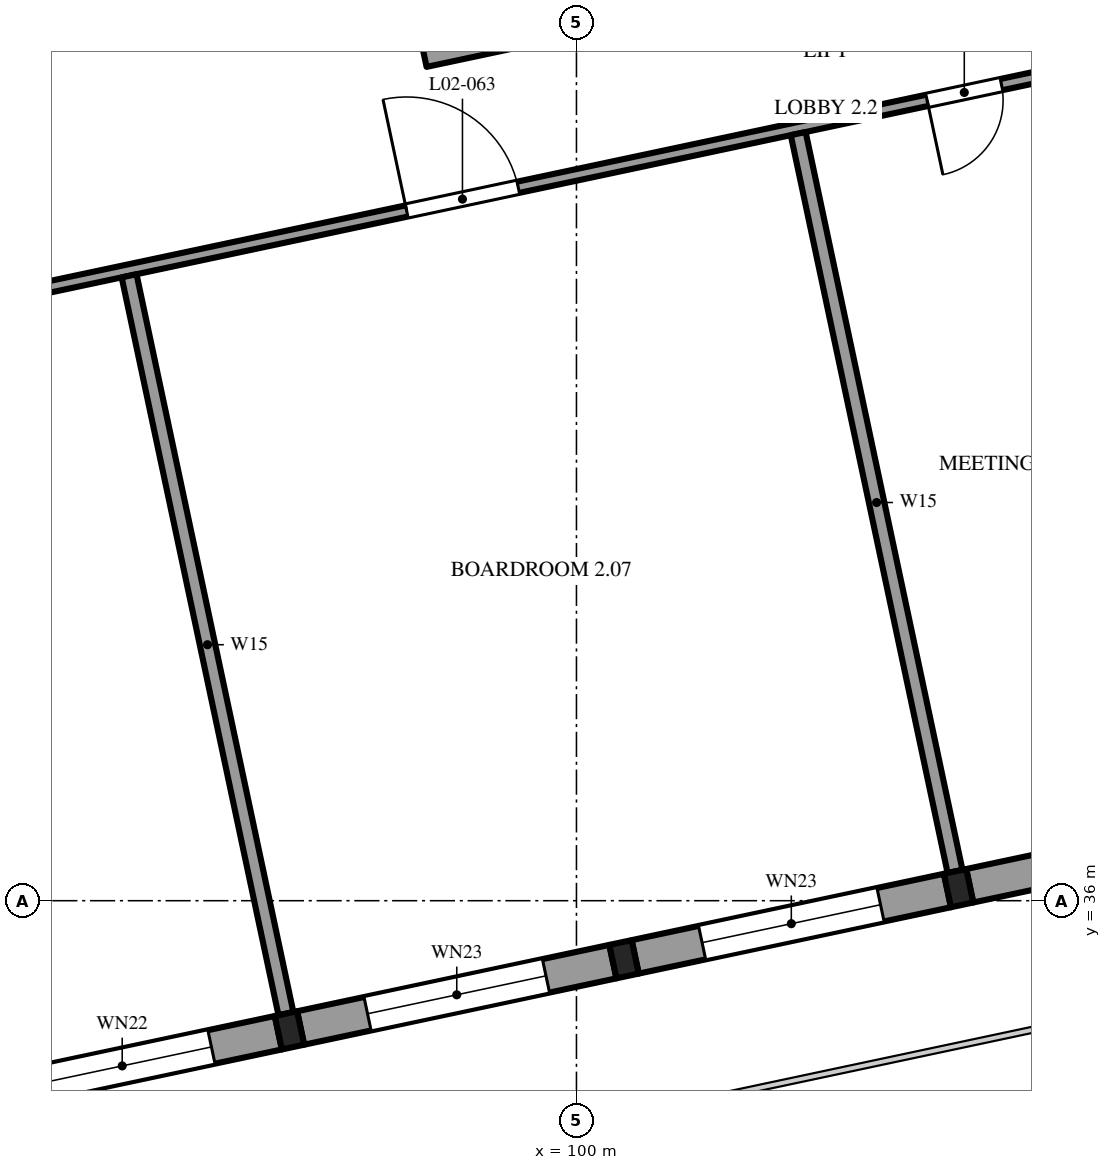
"""IFC4 building model, lengths in metres.
Left out: names, types, materials, properties, quantities, classifications, styles, units other than length and angle.
Written with IfcOpenShell. Run it as: python <this file> out.ifc"""

import sys

from ifc_helpers import new_model, si_unit, direction, frame, frame_2d, origin, origin_2d, place, context, subcontext, project, spatial, rectangle, i_section, extrude, element, fill, save


model = new_model("IFC4")
c1 = context("Model", 3, precision=1e-05, world=origin(), true_north=direction((0.0, 1.0)))
c2 = subcontext(c1, "Body", "Model", "MODEL_VIEW")
j1 = project(units=[si_unit("LENGTHUNIT", "METRE"), si_unit("PLANEANGLEUNIT", "RADIAN")], contexts=[c1])
p1 = place(None, origin())
s1 = spatial("IfcSite", under=j1, at=p1, CompositionType="ELEMENT")
p2 = place(p1, origin())
s2 = spatial("IfcBuilding", under=s1, at=p2, CompositionType="ELEMENT")
p3 = place(p2, frame((0.0, 0.0, 12.0)))
s3 = spatial("IfcBuildingStorey", under=s2, at=p3, CompositionType="ELEMENT", Elevation=12.0)
for number, where, z_axis, x_axis in (
    (1, (96.224, 34.294, 0.0), (0.0, 0.0, 1.0), (0.978, 0.208, 0.0)),
    (2, (100.626, 35.23, 0.0), (0.0, 0.0, 1.0), (0.978, 0.208, 0.0)),
    (3, (105.028, 36.165, 0.0), (0.0, 0.0, 1.0), (0.978, 0.208, 0.0)),
):
    element("IfcColumn", number, at=place(p3, frame(where, z_axis=z_axis, x_axis=x_axis)), inside=s3, PredefinedType="COLUMN", context=c2, shape_type="SweptSolid", body=[
        extrude(i_section(OverallWidth=0.3, OverallDepth=0.45, WebThickness=0.014, FlangeThickness=0.026, FilletRadius=0.027, at=origin_2d()), origin(), (0.0, 0.0, 1.0), 4.8),
    ])
p4 = place(p3, frame((97.997, 47.118, 0.0), z_axis=(0.0, 0.0, 1.0), x_axis=(0.978147662755, 0.20791139903, 0.0)))
e4 = element("IfcWall", 4, at=p4, inside=s3, PredefinedType="SHEAR", context=c2, shape_type="SweptSolid", body=[
    extrude(rectangle(XDim=13.7, YDim=0.3, at=frame_2d((6.85, 0.0))), origin(), (0.0, 0.0, 1.0), 4.8),
])
p5 = place(p4, frame((5.1, 0.0, 0.0)))
e5 = element("IfcOpeningElement", 5, at=p5, cuts=e4, PredefinedType="OPENING", context=c2, shape_type="SweptSolid", body=[
    extrude(rectangle(XDim=1.1, YDim=2.1, at=frame_2d((0.55, 1.05))), frame((0.0, 0.16, 0.0), z_axis=(0.0, -1.0, 0.0), x_axis=(1.0, 0.0, 0.0)), (0.0, 0.0, 1.0), 0.32),
])
p6 = place(p4, frame((7.5, 0.0, 0.0)))
e6 = element("IfcOpeningElement", 6, at=p6, cuts=e4, PredefinedType="OPENING", context=c2, shape_type="SweptSolid", body=[
    extrude(rectangle(XDim=1.1, YDim=2.1, at=frame_2d((0.55, 1.05))), frame((0.0, 0.16, 0.0), z_axis=(0.0, -1.0, 0.0), x_axis=(1.0, 0.0, 0.0)), (0.0, 0.0, 1.0), 0.32),
])
p7 = place(p3, frame((91.969, 33.39, 0.0), z_axis=(0.0, 0.0, 1.0), x_axis=(0.978143927149, 0.207928972925, 0.0)))
e7 = element("IfcWall", 7, at=p7, inside=s3, PredefinedType="SOLIDWALL", context=c2, shape_type="SweptSolid", body=[
    extrude(rectangle(XDim=4.2, YDim=0.45, at=frame_2d((2.1, 0.0))), origin(), (0.0, 0.0, 1.0), 4.35),
])
p8 = place(p7, frame((0.9, 0.0, 0.9)))
e8 = element("IfcOpeningElement", 8, at=p8, cuts=e7, PredefinedType="OPENING", context=c2, shape_type="SweptSolid", body=[
    extrude(rectangle(XDim=2.4, YDim=2.4, at=frame_2d((1.2, 1.2))), frame((0.0, 0.235, 0.0), z_axis=(0.0, -1.0, 0.0), x_axis=(1.0, 0.0, 0.0)), (0.0, 0.0, 1.0), 0.47),
])
p9 = place(p3, frame((96.371, 34.325, 0.0), z_axis=(0.0, 0.0, 1.0), x_axis=(0.978143927149, 0.207928972925, 0.0)))
e9 = element("IfcWall", 9, at=p9, inside=s3, PredefinedType="SOLIDWALL", context=c2, shape_type="SweptSolid", body=[
    extrude(rectangle(XDim=4.2, YDim=0.45, at=frame_2d((2.1, 0.0))), origin(), (0.0, 0.0, 1.0), 4.35),
])
p10 = place(p9, frame((0.9, 0.0, 0.6)))
e10 = element("IfcOpeningElement", 10, at=p10, cuts=e9, PredefinedType="OPENING", context=c2, shape_type="SweptSolid", body=[
    extrude(rectangle(XDim=2.4, YDim=2.7, at=frame_2d((1.2, 1.35))), frame((0.0, 0.235, 0.0), z_axis=(0.0, -1.0, 0.0), x_axis=(1.0, 0.0, 0.0)), (0.0, 0.0, 1.0), 0.47),
])
p11 = place(p3, frame((100.773, 35.261, 0.0), z_axis=(0.0, 0.0, 1.0), x_axis=(0.978143927149, 0.207928972925, 0.0)))
e11 = element("IfcWall", 11, at=p11, inside=s3, PredefinedType="SOLIDWALL", context=c2, shape_type="SweptSolid", body=[
    extrude(rectangle(XDim=4.2, YDim=0.45, at=frame_2d((2.1, 0.0))), origin(), (0.0, 0.0, 1.0), 4.35),
])
p12 = place(p11, frame((0.9, 0.0, 0.6)))
e12 = element("IfcOpeningElement", 12, at=p12, cuts=e11, PredefinedType="OPENING", context=c2, shape_type="SweptSolid", body=[
    extrude(rectangle(XDim=2.4, YDim=2.7, at=frame_2d((1.2, 1.35))), frame((0.0, 0.235, 0.0), z_axis=(0.0, -1.0, 0.0), x_axis=(1.0, 0.0, 0.0)), (0.0, 0.0, 1.0), 0.47),
])
p13 = place(p3, frame((105.174, 36.197, 0.0), z_axis=(0.0, 0.0, 1.0), x_axis=(0.978155748334, 0.207873355681, 0.0)))
e13 = element("IfcWall", 13, at=p13, inside=s3, PredefinedType="SOLIDWALL", context=c2, shape_type="SweptSolid", body=[
    extrude(rectangle(XDim=4.2, YDim=0.45, at=frame_2d((2.1, 0.0))), origin(), (0.0, 0.0, 1.0), 4.35),
])
p14 = place(p13, frame((0.9, 0.0, 0.9)))
e14 = element("IfcOpeningElement", 14, at=p14, cuts=e13, PredefinedType="OPENING", context=c2, shape_type="SweptSolid", body=[
    extrude(rectangle(XDim=2.4, YDim=2.4, at=frame_2d((1.2, 1.2))), frame((0.0, 0.235, 0.0), z_axis=(0.0, -1.0, 0.0), x_axis=(1.0, 0.0, 0.0)), (0.0, 0.0, 1.0), 0.47),
])
p15 = place(p3, frame((80.893, 41.489, 0.0), z_axis=(0.0, 0.0, 1.0), x_axis=(0.978147680869, 0.207911313813, 0.0)))
e15 = element("IfcWall", 15, at=p15, inside=s3, PredefinedType="PARTITIONING", context=c2, shape_type="SweptSolid", body=[
    extrude(rectangle(XDim=40.5, YDim=0.15, at=frame_2d((20.25, 0.0))), origin(), (0.0, 0.0, 1.0), 3.75),
])
p16 = place(p15, frame((1.75, 0.0, 0.0)))
e16 = element("IfcOpeningElement", 16, at=p16, cuts=e15, PredefinedType="OPENING", context=c2, shape_type="SweptSolid", body=[
    extrude(rectangle(XDim=1.0, YDim=2.1, at=frame_2d((0.5, 1.05))), frame((0.0, 0.085, 0.0), z_axis=(0.0, -1.0, 0.0), x_axis=(1.0, 0.0, 0.0)), (0.0, 0.0, 1.0), 0.17),
])
p17 = place(p15, frame((8.1, 0.0, 0.0)))
e17 = element("IfcOpeningElement", 17, at=p17, cuts=e15, PredefinedType="OPENING", context=c2, shape_type="SweptSolid", body=[
    extrude(rectangle(XDim=1.8, YDim=2.1, at=frame_2d((0.9, 1.05))), frame((0.0, 0.085, 0.0), z_axis=(0.0, -1.0, 0.0), x_axis=(1.0, 0.0, 0.0)), (0.0, 0.0, 1.0), 0.17),
])
p18 = place(p15, frame((17.25, 0.0, 0.0)))
e18 = element("IfcOpeningElement", 18, at=p18, cuts=e15, PredefinedType="OPENING", context=c2, shape_type="SweptSolid", body=[
    extrude(rectangle(XDim=1.5, YDim=2.1, at=frame_2d((0.75, 1.05))), frame((0.0, 0.085, 0.0), z_axis=(0.0, -1.0, 0.0), x_axis=(1.0, 0.0, 0.0)), (0.0, 0.0, 1.0), 0.17),
])
p19 = place(p15, frame((24.25, 0.0, 0.0)))
e19 = element("IfcOpeningElement", 19, at=p19, cuts=e15, PredefinedType="OPENING", context=c2, shape_type="SweptSolid", body=[
    extrude(rectangle(XDim=1.0, YDim=2.1, at=frame_2d((0.5, 1.05))), frame((0.0, 0.085, 0.0), z_axis=(0.0, -1.0, 0.0), x_axis=(1.0, 0.0, 0.0)), (0.0, 0.0, 1.0), 0.17),
])
p20 = place(p15, frame((30.6, 0.0, 0.0)))
e20 = element("IfcOpeningElement", 20, at=p20, cuts=e15, PredefinedType="OPENING", context=c2, shape_type="SweptSolid", body=[
    extrude(rectangle(XDim=1.8, YDim=2.1, at=frame_2d((0.9, 1.05))), frame((0.0, 0.085, 0.0), z_axis=(0.0, -1.0, 0.0), x_axis=(1.0, 0.0, 0.0)), (0.0, 0.0, 1.0), 0.17),
])
p21 = place(p15, frame((37.75, 0.0, 0.0)))
e21 = element("IfcOpeningElement", 21, at=p21, cuts=e15, PredefinedType="OPENING", context=c2, shape_type="SweptSolid", body=[
    extrude(rectangle(XDim=1.0, YDim=2.1, at=frame_2d((0.5, 1.05))), frame((0.0, 0.085, 0.0), z_axis=(0.0, -1.0, 0.0), x_axis=(1.0, 0.0, 0.0)), (0.0, 0.0, 1.0), 0.17),
])
p22 = place(p3, frame((96.177, 34.514, 0.0), z_axis=(0.0, 0.0, 1.0), x_axis=(-0.20790935802, 0.978148096582, 0.0)))
e22 = element("IfcWall", 22, at=p22, inside=s3, PredefinedType="PARTITIONING", context=c2, shape_type="SweptSolid", body=[
    extrude(rectangle(XDim=9.925, YDim=0.2, at=frame_2d((4.962, 0.0))), origin(), (0.0, 0.0, 1.0), 3.75),
])
p23 = place(p3, frame((104.981, 36.385, 0.0), z_axis=(0.0, 0.0, 1.0), x_axis=(-0.207927890391, 0.978144157268, 0.0)))
e23 = element("IfcWall", 23, at=p23, inside=s3, PredefinedType="PARTITIONING", context=c2, shape_type="SweptSolid", body=[
    extrude(rectangle(XDim=9.925, YDim=0.2, at=frame_2d((4.963, 0.0))), origin(), (0.0, 0.0, 1.0), 3.75),
])
p24 = place(p3, frame((59.663, 40.605, 0.0), z_axis=(0.0, 0.0, 1.0), x_axis=(0.978147466509, 0.207912322295, 0.0)))
e24 = element("IfcWall", 24, at=p24, inside=s3, PredefinedType="PARTITIONING", context=c2, shape_type="SweptSolid", body=[
    extrude(rectangle(XDim=34.45, YDim=0.15, at=frame_2d((17.225, 0.0))), origin(), (0.0, 0.0, 1.0), 3.75),
])
p25 = place(p24, frame((3.225, 0.0, 0.0)))
e25 = element("IfcOpeningElement", 25, at=p25, cuts=e24, PredefinedType="OPENING", context=c2, shape_type="SweptSolid", body=[
    extrude(rectangle(XDim=1.0, YDim=2.1, at=frame_2d((0.5, 1.05))), frame((0.0, 0.085, 0.0), z_axis=(0.0, -1.0, 0.0), x_axis=(1.0, 0.0, 0.0)), (0.0, 0.0, 1.0), 0.17),
])
p26 = place(p24, frame((9.2, 0.0, 0.0)))
e26 = element("IfcOpeningElement", 26, at=p26, cuts=e24, PredefinedType="OPENING", context=c2, shape_type="SweptSolid", body=[
    extrude(rectangle(XDim=1.0, YDim=2.1, at=frame_2d((0.5, 1.05))), frame((0.0, 0.085, 0.0), z_axis=(0.0, -1.0, 0.0), x_axis=(1.0, 0.0, 0.0)), (0.0, 0.0, 1.0), 0.17),
])
p27 = place(p24, frame((15.55, 0.0, 0.0)))
e27 = element("IfcOpeningElement", 27, at=p27, cuts=e24, PredefinedType="OPENING", context=c2, shape_type="SweptSolid", body=[
    extrude(rectangle(XDim=1.8, YDim=2.1, at=frame_2d((0.9, 1.05))), frame((0.0, 0.085, 0.0), z_axis=(0.0, -1.0, 0.0), x_axis=(1.0, 0.0, 0.0)), (0.0, 0.0, 1.0), 0.17),
])
p28 = place(p24, frame((26.8, 0.0, 0.0)))
e28 = element("IfcOpeningElement", 28, at=p28, cuts=e24, PredefinedType="OPENING", context=c2, shape_type="SweptSolid", body=[
    extrude(rectangle(XDim=1.8, YDim=2.1, at=frame_2d((0.9, 1.05))), frame((0.0, 0.085, 0.0), z_axis=(0.0, -1.0, 0.0), x_axis=(1.0, 0.0, 0.0)), (0.0, 0.0, 1.0), 0.17),
])
p29 = place(p8, origin())
e29 = element("IfcWindow", 29, at=p29, inside=s3, PartitioningType="SINGLE_PANEL", PredefinedType="WINDOW", context=c2, shape_type="SweptSolid", body=[
    extrude(rectangle(XDim=2.4, YDim=2.4, at=frame_2d((1.2, 1.2))), frame((0.0, 0.03, 0.0), z_axis=(0.0, -1.0, 0.0), x_axis=(1.0, 0.0, 0.0)), (0.0, 0.0, 1.0), 0.06),
])
fill(e8, e29)
p30 = place(p10, origin())
e30 = element("IfcWindow", 30, at=p30, inside=s3, PartitioningType="SINGLE_PANEL", PredefinedType="WINDOW", context=c2, shape_type="SweptSolid", body=[
    extrude(rectangle(XDim=2.4, YDim=2.7, at=frame_2d((1.2, 1.35))), frame((0.0, 0.03, 0.0), z_axis=(0.0, -1.0, 0.0), x_axis=(1.0, 0.0, 0.0)), (0.0, 0.0, 1.0), 0.06),
])
fill(e10, e30)
p31 = place(p12, origin())
e31 = element("IfcWindow", 31, at=p31, inside=s3, PartitioningType="SINGLE_PANEL", PredefinedType="WINDOW", context=c2, shape_type="SweptSolid", body=[
    extrude(rectangle(XDim=2.4, YDim=2.7, at=frame_2d((1.2, 1.35))), frame((0.0, 0.03, 0.0), z_axis=(0.0, -1.0, 0.0), x_axis=(1.0, 0.0, 0.0)), (0.0, 0.0, 1.0), 0.06),
])
fill(e12, e31)
p32 = place(p18, origin())
e32 = element("IfcDoor", 32, at=p32, inside=s3, OperationType="DOUBLE_DOOR_SINGLE_SWING", PredefinedType="DOOR", context=c2, shape_type="SweptSolid", body=[
    extrude(rectangle(XDim=1.5, YDim=2.1, at=frame_2d((0.75, 1.05))), frame((0.0, 0.025, 0.0), z_axis=(0.0, -1.0, 0.0), x_axis=(1.0, 0.0, 0.0)), (0.0, 0.0, 1.0), 0.05),
])
fill(e18, e32)
p33 = place(p19, frame((1.0, 0.0, 0.0), z_axis=(0.0, 0.0, 1.0), x_axis=(-1.0, 0.0, 0.0)))
e33 = element("IfcDoor", 33, at=p33, inside=s3, OperationType="SINGLE_SWING_RIGHT", PredefinedType="DOOR", context=c2, shape_type="SweptSolid", body=[
    extrude(rectangle(XDim=1.0, YDim=2.1, at=frame_2d((0.5, 1.05))), frame((0.0, 0.025, 0.0), z_axis=(0.0, -1.0, 0.0), x_axis=(1.0, 0.0, 0.0)), (0.0, 0.0, 1.0), 0.05),
])
fill(e19, e33)
save(model, sys.argv[1])
